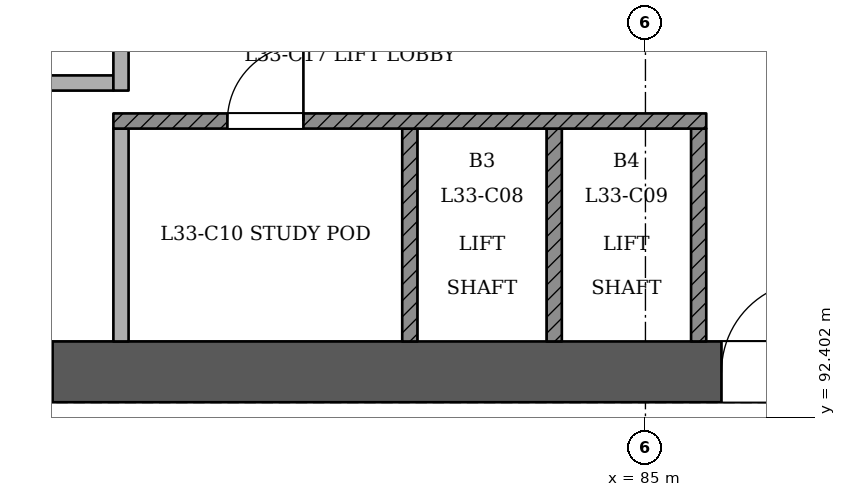
"""IFC4 building model, lengths in metres.
Left out: names, types, materials, properties, quantities, classifications, styles, units other than length and angle.
Written with IfcOpenShell. Run it as: python <this file> out.ifc"""

import sys

from ifc_helpers import new_model, si_unit, direction, frame, frame_2d, origin, place, context, subcontext, project, spatial, rectangle, extrude, element, fill, save


model = new_model("IFC4")
c1 = context("Model", 3, precision=1e-05, world=origin(), true_north=direction((0.0, 1.0)))
c2 = subcontext(c1, "Body", "Model", "MODEL_VIEW")
j1 = project(units=[si_unit("LENGTHUNIT", "METRE"), si_unit("PLANEANGLEUNIT", "RADIAN")], contexts=[c1])
p1 = place(None, origin())
s1 = spatial("IfcSite", under=j1, at=p1, CompositionType="ELEMENT")
p2 = place(p1, origin())
s2 = spatial("IfcBuilding", under=s1, at=p2, CompositionType="ELEMENT")
p3 = place(p2, frame((0.0, 0.0, 131.4)))
s3 = spatial("IfcBuildingStorey", under=s2, at=p3, CompositionType="ELEMENT", Elevation=131.4)
p4 = place(p3, frame((72.6, 93.0, 0.0), z_axis=(0.0, 0.0, 1.0), x_axis=(1.0, 0.0, 0.0)))
e1 = element("IfcWall", 1, at=p4, inside=s3, PredefinedType="SHEAR", context=c2, shape_type="SweptSolid", body=[
    extrude(rectangle(XDim=25.2, YDim=0.8, at=frame_2d((12.6, 0.0))), origin(), (0.0, 0.0, 1.0), 3.6),
])
p5 = place(p4, frame((1.2, 0.0, 0.0)))
e2 = element("IfcOpeningElement", 2, at=p5, cuts=e1, PredefinedType="OPENING", context=c2, shape_type="SweptSolid", body=[
    extrude(rectangle(XDim=1.2, YDim=2.1, at=frame_2d((0.6, 1.05))), frame((0.0, 0.411, 0.0), z_axis=(0.0, -1.0, 0.0), x_axis=(1.0, 0.0, 0.0)), (0.0, 0.0, 1.0), 0.821),
])
p6 = place(p4, frame((3.4, 0.0, 0.0)))
e3 = element("IfcOpeningElement", 3, at=p6, cuts=e1, PredefinedType="OPENING", context=c2, shape_type="SweptSolid", body=[
    extrude(rectangle(XDim=1.2, YDim=2.1, at=frame_2d((0.6, 1.05))), frame((0.0, 0.411, 0.0), z_axis=(0.0, -1.0, 0.0), x_axis=(1.0, 0.0, 0.0)), (0.0, 0.0, 1.0), 0.821),
])
p7 = place(p4, frame((13.4, 0.0, 0.0)))
e4 = element("IfcOpeningElement", 4, at=p7, cuts=e1, PredefinedType="OPENING", context=c2, shape_type="SweptSolid", body=[
    extrude(rectangle(XDim=1.2, YDim=2.1, at=frame_2d((0.6, 1.05))), frame((0.0, 0.411, 0.0), z_axis=(0.0, -1.0, 0.0), x_axis=(1.0, 0.0, 0.0)), (0.0, 0.0, 1.0), 0.821),
])
p8 = place(p4, frame((16.062, 0.0, 0.0)))
e5 = element("IfcOpeningElement", 5, at=p8, cuts=e1, PredefinedType="OPENING", context=c2, shape_type="SweptSolid", body=[
    extrude(rectangle(XDim=1.0, YDim=2.1, at=frame_2d((0.5, 1.05))), frame((0.0, 0.411, 0.0), z_axis=(0.0, -1.0, 0.0), x_axis=(1.0, 0.0, 0.0)), (0.0, 0.0, 1.0), 0.821),
])
p9 = place(p4, frame((18.85, 0.0, 0.0)))
e6 = element("IfcOpeningElement", 6, at=p9, cuts=e1, PredefinedType="OPENING", context=c2, shape_type="SweptSolid", body=[
    extrude(rectangle(XDim=1.0, YDim=2.1, at=frame_2d((0.5, 1.05))), frame((0.0, 0.411, 0.0), z_axis=(0.0, -1.0, 0.0), x_axis=(1.0, 0.0, 0.0)), (0.0, 0.0, 1.0), 0.821),
])
p10 = place(p4, frame((22.038, 0.0, 0.0)))
e7 = element("IfcOpeningElement", 7, at=p10, cuts=e1, PredefinedType="OPENING", context=c2, shape_type="SweptSolid", body=[
    extrude(rectangle(XDim=1.0, YDim=2.1, at=frame_2d((0.5, 1.05))), frame((0.0, 0.411, 0.0), z_axis=(0.0, -1.0, 0.0), x_axis=(1.0, 0.0, 0.0)), (0.0, 0.0, 1.0), 0.821),
])
p11 = place(p3, frame((64.656, 98.273, 0.0), z_axis=(0.0, 0.0, 1.0), x_axis=(0.500001784794, -0.866024373331, 0.0)))
e8 = element("IfcWall", 8, at=p11, inside=s3, PredefinedType="PARTITIONING", context=c2, shape_type="SweptSolid", body=[
    extrude(rectangle(XDim=40.426, YDim=0.15, at=frame_2d((20.213, 0.0))), origin(), (0.0, 0.0, 1.0), 2.75),
])
p12 = place(p11, frame((0.2, 0.0, 0.0)))
e9 = element("IfcOpeningElement", 9, at=p12, cuts=e8, PredefinedType="OPENING", context=c2, shape_type="SweptSolid", body=[
    extrude(rectangle(XDim=1.2, YDim=2.1, at=frame_2d((0.6, 1.05))), frame((0.0, 0.085, 0.0), z_axis=(0.0, -1.0, 0.0), x_axis=(1.0, 0.0, 0.0)), (0.0, 0.0, 1.0), 0.171),
])
p13 = place(p11, frame((2.933, 0.0, 0.0)))
e10 = element("IfcOpeningElement", 10, at=p13, cuts=e8, PredefinedType="OPENING", context=c2, shape_type="SweptSolid", body=[
    extrude(rectangle(XDim=1.0, YDim=2.1, at=frame_2d((0.5, 1.05))), frame((0.0, 0.085, 0.0), z_axis=(0.0, -1.0, 0.0), x_axis=(1.0, 0.0, 0.0)), (0.0, 0.0, 1.0), 0.171),
])
p14 = place(p11, frame((9.608, 0.0, 0.0)))
e11 = element("IfcOpeningElement", 11, at=p14, cuts=e8, PredefinedType="OPENING", context=c2, shape_type="SweptSolid", body=[
    extrude(rectangle(XDim=1.0, YDim=2.1, at=frame_2d((0.5, 1.05))), frame((0.0, 0.085, 0.0), z_axis=(0.0, -1.0, 0.0), x_axis=(1.0, 0.0, 0.0)), (0.0, 0.0, 1.0), 0.171),
])
p15 = place(p11, frame((11.818, 0.0, 0.0)))
e12 = element("IfcOpeningElement", 12, at=p15, cuts=e8, PredefinedType="OPENING", context=c2, shape_type="SweptSolid", body=[
    extrude(rectangle(XDim=1.0, YDim=2.1, at=frame_2d((0.5, 1.05))), frame((0.0, 0.085, 0.0), z_axis=(0.0, -1.0, 0.0), x_axis=(1.0, 0.0, 0.0)), (0.0, 0.0, 1.0), 0.171),
])
p16 = place(p11, frame((18.493, 0.0, 0.0)))
e13 = element("IfcOpeningElement", 13, at=p16, cuts=e8, PredefinedType="OPENING", context=c2, shape_type="SweptSolid", body=[
    extrude(rectangle(XDim=1.0, YDim=2.1, at=frame_2d((0.5, 1.05))), frame((0.0, 0.085, 0.0), z_axis=(0.0, -1.0, 0.0), x_axis=(1.0, 0.0, 0.0)), (0.0, 0.0, 1.0), 0.171),
])
p17 = place(p11, frame((21.963, 0.0, 0.0)))
e14 = element("IfcOpeningElement", 14, at=p17, cuts=e8, PredefinedType="OPENING", context=c2, shape_type="SweptSolid", body=[
    extrude(rectangle(XDim=1.0, YDim=2.1, at=frame_2d((0.5, 1.05))), frame((0.0, 0.085, 0.0), z_axis=(0.0, -1.0, 0.0), x_axis=(1.0, 0.0, 0.0)), (0.0, 0.0, 1.0), 0.171),
])
p18 = place(p11, frame((27.493, 0.0, 0.0)))
e15 = element("IfcOpeningElement", 15, at=p18, cuts=e8, PredefinedType="OPENING", context=c2, shape_type="SweptSolid", body=[
    extrude(rectangle(XDim=1.0, YDim=2.1, at=frame_2d((0.5, 1.05))), frame((0.0, 0.085, 0.0), z_axis=(0.0, -1.0, 0.0), x_axis=(1.0, 0.0, 0.0)), (0.0, 0.0, 1.0), 0.171),
])
p19 = place(p11, frame((30.963, 0.0, 0.0)))
e16 = element("IfcOpeningElement", 16, at=p19, cuts=e8, PredefinedType="OPENING", context=c2, shape_type="SweptSolid", body=[
    extrude(rectangle(XDim=1.0, YDim=2.1, at=frame_2d((0.5, 1.05))), frame((0.0, 0.085, 0.0), z_axis=(0.0, -1.0, 0.0), x_axis=(1.0, 0.0, 0.0)), (0.0, 0.0, 1.0), 0.171),
])
p20 = place(p11, frame((36.493, 0.0, 0.0)))
e17 = element("IfcOpeningElement", 17, at=p20, cuts=e8, PredefinedType="OPENING", context=c2, shape_type="SweptSolid", body=[
    extrude(rectangle(XDim=1.0, YDim=2.1, at=frame_2d((0.5, 1.05))), frame((0.0, 0.085, 0.0), z_axis=(0.0, -1.0, 0.0), x_axis=(1.0, 0.0, 0.0)), (0.0, 0.0, 1.0), 0.171),
])
p21 = place(p11, frame((39.101, 0.0, 0.0)))
e18 = element("IfcOpeningElement", 18, at=p21, cuts=e8, PredefinedType="OPENING", context=c2, shape_type="SweptSolid", body=[
    extrude(rectangle(XDim=1.0, YDim=2.1, at=frame_2d((0.5, 1.05))), frame((0.0, 0.085, 0.0), z_axis=(0.0, -1.0, 0.0), x_axis=(1.0, 0.0, 0.0)), (0.0, 0.0, 1.0), 0.171),
])
p22 = place(p3, frame((85.131, 63.263, 0.0), z_axis=(0.0, 0.0, 1.0), x_axis=(0.500002881847, 0.866023739943, 0.0)))
e19 = element("IfcWall", 19, at=p22, inside=s3, PredefinedType="PARTITIONING", context=c2, shape_type="SweptSolid", body=[
    extrude(rectangle(XDim=34.013, YDim=0.15, at=frame_2d((17.006, 0.0))), origin(), (0.0, 0.0, 1.0), 2.75),
])
p23 = place(p22, frame((0.351, 0.0, 0.0)))
e20 = element("IfcOpeningElement", 20, at=p23, cuts=e19, PredefinedType="OPENING", context=c2, shape_type="SweptSolid", body=[
    extrude(rectangle(XDim=1.2, YDim=2.1, at=frame_2d((0.6, 1.05))), frame((0.0, 0.085, 0.0), z_axis=(0.0, -1.0, 0.0), x_axis=(1.0, 0.0, 0.0)), (0.0, 0.0, 1.0), 0.171),
])
p24 = place(p22, frame((3.963, 0.0, 0.0)))
e21 = element("IfcOpeningElement", 21, at=p24, cuts=e19, PredefinedType="OPENING", context=c2, shape_type="SweptSolid", body=[
    extrude(rectangle(XDim=1.0, YDim=2.1, at=frame_2d((0.5, 1.05))), frame((0.0, 0.085, 0.0), z_axis=(0.0, -1.0, 0.0), x_axis=(1.0, 0.0, 0.0)), (0.0, 0.0, 1.0), 0.171),
])
p25 = place(p22, frame((9.493, 0.0, 0.0)))
e22 = element("IfcOpeningElement", 22, at=p25, cuts=e19, PredefinedType="OPENING", context=c2, shape_type="SweptSolid", body=[
    extrude(rectangle(XDim=1.0, YDim=2.1, at=frame_2d((0.5, 1.05))), frame((0.0, 0.085, 0.0), z_axis=(0.0, -1.0, 0.0), x_axis=(1.0, 0.0, 0.0)), (0.0, 0.0, 1.0), 0.171),
])
p26 = place(p22, frame((11.818, 0.0, 0.0)))
e23 = element("IfcOpeningElement", 23, at=p26, cuts=e19, PredefinedType="OPENING", context=c2, shape_type="SweptSolid", body=[
    extrude(rectangle(XDim=1.0, YDim=2.1, at=frame_2d((0.5, 1.05))), frame((0.0, 0.085, 0.0), z_axis=(0.0, -1.0, 0.0), x_axis=(1.0, 0.0, 0.0)), (0.0, 0.0, 1.0), 0.171),
])
p27 = place(p22, frame((18.608, 0.0, 0.0)))
e24 = element("IfcOpeningElement", 24, at=p27, cuts=e19, PredefinedType="OPENING", context=c2, shape_type="SweptSolid", body=[
    extrude(rectangle(XDim=1.0, YDim=2.1, at=frame_2d((0.5, 1.05))), frame((0.0, 0.085, 0.0), z_axis=(0.0, -1.0, 0.0), x_axis=(1.0, 0.0, 0.0)), (0.0, 0.0, 1.0), 0.171),
])
p28 = place(p22, frame((20.933, 0.0, 0.0)))
e25 = element("IfcOpeningElement", 25, at=p28, cuts=e19, PredefinedType="OPENING", context=c2, shape_type="SweptSolid", body=[
    extrude(rectangle(XDim=1.0, YDim=2.1, at=frame_2d((0.5, 1.05))), frame((0.0, 0.085, 0.0), z_axis=(0.0, -1.0, 0.0), x_axis=(1.0, 0.0, 0.0)), (0.0, 0.0, 1.0), 0.171),
])
p29 = place(p22, frame((27.493, 0.0, 0.0)))
e26 = element("IfcOpeningElement", 26, at=p29, cuts=e19, PredefinedType="OPENING", context=c2, shape_type="SweptSolid", body=[
    extrude(rectangle(XDim=1.0, YDim=2.1, at=frame_2d((0.5, 1.05))), frame((0.0, 0.085, 0.0), z_axis=(0.0, -1.0, 0.0), x_axis=(1.0, 0.0, 0.0)), (0.0, 0.0, 1.0), 0.171),
])
p30 = place(p22, frame((29.933, 0.0, 0.0)))
e27 = element("IfcOpeningElement", 27, at=p30, cuts=e19, PredefinedType="OPENING", context=c2, shape_type="SweptSolid", body=[
    extrude(rectangle(XDim=1.0, YDim=2.1, at=frame_2d((0.5, 1.05))), frame((0.0, 0.085, 0.0), z_axis=(0.0, -1.0, 0.0), x_axis=(1.0, 0.0, 0.0)), (0.0, 0.0, 1.0), 0.171),
])
p31 = place(p3, frame((78.1, 93.4, 0.0), z_axis=(0.0, 0.0, 1.0), x_axis=(0.0, 1.0, 0.0)))
e28 = element("IfcWall", 28, at=p31, inside=s3, PredefinedType="PARTITIONING", context=c2, shape_type="SweptSolid", body=[
    extrude(rectangle(XDim=2.8, YDim=0.2, at=frame_2d((1.4, 0.0))), origin(), (0.0, 0.0, 1.0), 3.15),
])
for number, where, z_axis, x_axis in (
    (29, (81.9, 93.4, 0.0), (0.0, 0.0, 1.0), (0.0, 1.0, 0.0)),
    (30, (83.8, 93.4, 0.0), (0.0, 0.0, 1.0), (0.0, 1.0, 0.0)),
    (31, (85.7, 93.4, 0.0), (0.0, 0.0, 1.0), (0.0, 1.0, 0.0)),
):
    element("IfcWall", number, at=place(p3, frame(where, z_axis=z_axis, x_axis=x_axis)), inside=s3, PredefinedType="SOLIDWALL", context=c2, shape_type="SweptSolid", body=[
        extrude(rectangle(XDim=2.8, YDim=0.2, at=frame_2d((1.4, 0.0))), origin(), (0.0, 0.0, 1.0), 3.15),
    ])
p32 = place(p3, frame((78.0, 96.3, 0.0), z_axis=(0.0, 0.0, 1.0), x_axis=(1.0, 0.0, 0.0)))
e32 = element("IfcWall", 32, at=p32, inside=s3, PredefinedType="SOLIDWALL", context=c2, shape_type="SweptSolid", body=[
    extrude(rectangle(XDim=7.8, YDim=0.2, at=frame_2d((3.9, 0.0))), origin(), (0.0, 0.0, 1.0), 3.15),
])
p33 = place(p32, frame((1.5, 0.0, 0.0)))
e33 = element("IfcOpeningElement", 33, at=p33, cuts=e32, PredefinedType="OPENING", context=c2, shape_type="SweptSolid", body=[
    extrude(rectangle(XDim=1.0, YDim=2.1, at=frame_2d((0.5, 1.05))), frame((0.0, 0.11, 0.0), z_axis=(0.0, -1.0, 0.0), x_axis=(1.0, 0.0, 0.0)), (0.0, 0.0, 1.0), 0.221),
])
p34 = place(p3, frame((76.1, 96.8, 0.0), z_axis=(0.0, 0.0, 1.0), x_axis=(1.0, 0.0, 0.0)))
e34 = element("IfcWall", 34, at=p34, inside=s3, PredefinedType="PARTITIONING", context=c2, shape_type="SweptSolid", body=[
    extrude(rectangle(XDim=1.9, YDim=0.2, at=frame_2d((0.95, 0.0))), origin(), (0.0, 0.0, 1.0), 3.15),
])
p35 = place(p3, frame((78.1, 96.7, 0.0), z_axis=(0.0, 0.0, 1.0), x_axis=(0.0, 1.0, 0.0)))
e35 = element("IfcWall", 35, at=p35, inside=s3, PredefinedType="PARTITIONING", context=c2, shape_type="SweptSolid", body=[
    extrude(rectangle(XDim=3.7, YDim=0.2, at=frame_2d((1.85, 0.0))), origin(), (0.0, 0.0, 1.0), 3.15),
])
p36 = place(p35, frame((1.95, 0.0, 0.0)))
e36 = element("IfcOpeningElement", 36, at=p36, cuts=e35, PredefinedType="OPENING", context=c2, shape_type="SweptSolid", body=[
    extrude(rectangle(XDim=1.1, YDim=2.1, at=frame_2d((0.55, 1.05))), frame((0.0, 0.11, 0.0), z_axis=(0.0, -1.0, 0.0), x_axis=(1.0, 0.0, 0.0)), (0.0, 0.0, 1.0), 0.221),
])
p37 = place(p6, origin())
e37 = element("IfcDoor", 37, at=p37, inside=s3, OperationType="SINGLE_SWING_LEFT", PredefinedType="NOTDEFINED", context=c2, shape_type="SweptSolid", body=[
    extrude(rectangle(XDim=1.2, YDim=2.1, at=frame_2d((0.6, 1.05))), frame((0.0, 0.025, 0.0), z_axis=(0.0, -1.0, 0.0), x_axis=(1.0, 0.0, 0.0)), (0.0, 0.0, 1.0), 0.05),
])
fill(e3, e37)
p38 = place(p7, origin())
e38 = element("IfcDoor", 38, at=p38, inside=s3, OperationType="SINGLE_SWING_RIGHT", PredefinedType="NOTDEFINED", context=c2, shape_type="SweptSolid", body=[
    extrude(rectangle(XDim=1.2, YDim=2.1, at=frame_2d((0.6, 1.05))), frame((0.0, 0.025, 0.0), z_axis=(0.0, -1.0, 0.0), x_axis=(1.0, 0.0, 0.0)), (0.0, 0.0, 1.0), 0.05),
])
fill(e4, e38)
p39 = place(p33, origin())
e39 = element("IfcDoor", 39, at=p39, inside=s3, OperationType="SINGLE_SWING_RIGHT", PredefinedType="NOTDEFINED", context=c2, shape_type="SweptSolid", body=[
    extrude(rectangle(XDim=1.0, YDim=2.1, at=frame_2d((0.5, 1.05))), frame((0.0, 0.025, 0.0), z_axis=(0.0, -1.0, 0.0), x_axis=(1.0, 0.0, 0.0)), (0.0, 0.0, 1.0), 0.05),
])
fill(e33, e39)
save(model, sys.argv[1])
